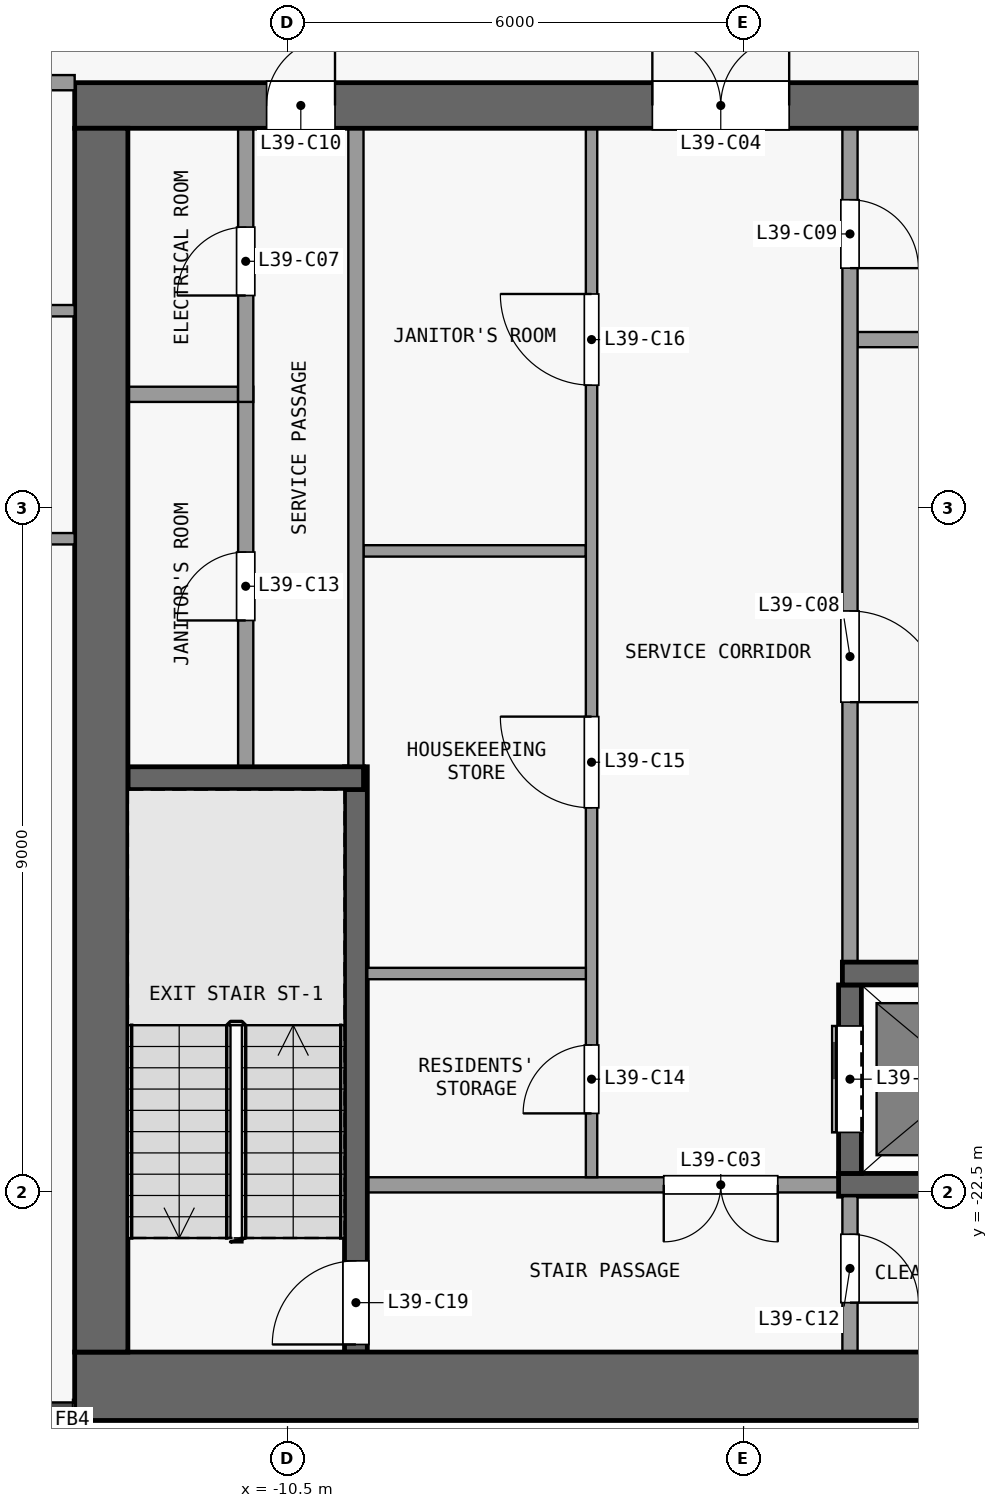
"""IFC4 building model, lengths in metres.
Left out: names, types, materials, properties, quantities, classifications, styles, units other than length and angle.
Written with IfcOpenShell. Run it as: python <this file> out.ifc"""

import sys

from ifc_helpers import new_model, si_unit, direction, frame, frame_2d, origin, place, context, subcontext, project, spatial, rectangle, extrude, element, fill, save


model = new_model("IFC4")
c1 = context("Model", 3, precision=1e-05, world=origin(), true_north=direction((0.0, 1.0)))
c2 = subcontext(c1, "Body", "Model", "MODEL_VIEW")
j1 = project(units=[si_unit("LENGTHUNIT", "METRE"), si_unit("PLANEANGLEUNIT", "RADIAN")], contexts=[c1])
p1 = place(None, origin())
s1 = spatial("IfcSite", under=j1, at=p1, CompositionType="ELEMENT")
p2 = place(p1, origin())
s2 = spatial("IfcBuilding", under=s1, at=p2, CompositionType="ELEMENT")
p3 = place(p2, frame((0.0, 0.0, 160.1)))
s3 = spatial("IfcBuildingStorey", under=s2, at=p3, CompositionType="ELEMENT", Elevation=160.1)
p4 = place(p3, frame((-13.3, -25.05, 0.0), z_axis=(0.0, 0.0, 1.0), x_axis=(1.0, 0.0, 0.0)))
e1 = element("IfcWall", 1, at=p4, inside=s3, PredefinedType="SHEAR", context=c2, shape_type="SweptSolid", body=[
    extrude(rectangle(XDim=26.6, YDim=0.9, at=frame_2d((13.3, 0.0))), origin(), (0.0, 0.0, 1.0), 3.3),
])
p5 = place(p3, frame((-13.3, -8.2, 0.0), z_axis=(0.0, 0.0, 1.0), x_axis=(1.0, 0.0, 0.0)))
e2 = element("IfcWall", 2, at=p5, inside=s3, PredefinedType="SHEAR", context=c2, shape_type="SweptSolid", body=[
    extrude(rectangle(XDim=26.6, YDim=0.6, at=frame_2d((13.3, 0.0))), origin(), (0.0, 0.0, 1.0), 3.3),
])
p6 = place(p5, frame((7.6, 0.0, 0.0)))
e3 = element("IfcOpeningElement", 3, at=p6, cuts=e2, PredefinedType="OPENING", context=c2, shape_type="SweptSolid", body=[
    extrude(rectangle(XDim=1.8, YDim=2.1, at=frame_2d((0.9, 1.05))), frame((0.0, 0.31, 0.0), z_axis=(0.0, -1.0, 0.0), x_axis=(1.0, 0.0, 0.0)), (0.0, 0.0, 1.0), 0.62),
])
p7 = place(p5, frame((17.2, 0.0, 0.0)))
e4 = element("IfcOpeningElement", 4, at=p7, cuts=e2, PredefinedType="OPENING", context=c2, shape_type="SweptSolid", body=[
    extrude(rectangle(XDim=1.8, YDim=2.1, at=frame_2d((0.9, 1.05))), frame((0.0, 0.31, 0.0), z_axis=(0.0, -1.0, 0.0), x_axis=(1.0, 0.0, 0.0)), (0.0, 0.0, 1.0), 0.62),
])
p8 = place(p5, frame((2.525, 0.0, 0.0)))
e5 = element("IfcOpeningElement", 5, at=p8, cuts=e2, PredefinedType="OPENING", context=c2, shape_type="SweptSolid", body=[
    extrude(rectangle(XDim=0.9, YDim=2.1, at=frame_2d((0.45, 1.05))), frame((0.0, 0.31, 0.0), z_axis=(0.0, -1.0, 0.0), x_axis=(1.0, 0.0, 0.0)), (0.0, 0.0, 1.0), 0.62),
])
p9 = place(p5, frame((23.875, 0.0, 0.0)))
e6 = element("IfcOpeningElement", 6, at=p9, cuts=e2, PredefinedType="OPENING", context=c2, shape_type="SweptSolid", body=[
    extrude(rectangle(XDim=1.2, YDim=2.1, at=frame_2d((0.6, 1.05))), frame((0.0, 0.31, 0.0), z_axis=(0.0, -1.0, 0.0), x_axis=(1.0, 0.0, 0.0)), (0.0, 0.0, 1.0), 0.62),
])
p10 = place(p3, frame((-12.95, -24.6, 0.0), z_axis=(0.0, 0.0, 1.0), x_axis=(0.0, 1.0, 0.0)))
e7 = element("IfcWall", 7, at=p10, inside=s3, PredefinedType="SHEAR", context=c2, shape_type="SweptSolid", body=[
    extrude(rectangle(XDim=16.1, YDim=0.7, at=frame_2d((8.05, 0.0))), origin(), (0.0, 0.0, 1.0), 3.3),
])
p11 = place(p3, frame((-3.25, -22.4, 0.0), z_axis=(0.0, 0.0, 1.0), x_axis=(-1.0, 0.0, 0.0)))
e8 = element("IfcWall", 8, at=p11, inside=s3, PredefinedType="PARTITIONING", context=c2, shape_type="SweptSolid", body=[
    extrude(rectangle(XDim=6.2, YDim=0.2, at=frame_2d((3.1, 0.0))), origin(), (0.0, 0.0, 1.0), 3.3),
])
p12 = place(p11, frame((0.8, 0.0, 0.0)))
e9 = element("IfcOpeningElement", 9, at=p12, cuts=e8, PredefinedType="OPENING", context=c2, shape_type="SweptSolid", body=[
    extrude(rectangle(XDim=1.5, YDim=2.1, at=frame_2d((0.75, 1.05))), frame((0.0, 0.11, 0.0), z_axis=(0.0, -1.0, 0.0), x_axis=(1.0, 0.0, 0.0)), (0.0, 0.0, 1.0), 0.22),
])
p13 = place(p3, frame((-3.25, -22.4, 0.0), z_axis=(0.0, 0.0, 1.0), x_axis=(1.0, 0.0, 0.0)))
e10 = element("IfcWall", 10, at=p13, inside=s3, PredefinedType="SHEAR", context=c2, shape_type="SweptSolid", body=[
    extrude(rectangle(XDim=6.2, YDim=0.3, at=frame_2d((3.1, 0.0))), origin(), (0.0, 0.0, 1.0), 3.3),
])
p14 = place(p3, frame((-9.45, -19.62, 0.0), z_axis=(0.0, 0.0, 1.0), x_axis=(1.0, 0.0, 0.0)))
e11 = element("IfcWall", 11, at=p14, inside=s3, PredefinedType="PARTITIONING", context=c2, shape_type="SweptSolid", body=[
    extrude(rectangle(XDim=2.875, YDim=0.15, at=frame_2d((1.438, 0.0))), origin(), (0.0, 0.0, 1.0), 3.3),
])
p15 = place(p3, frame((-3.2, -19.62, 0.0), z_axis=(0.0, 0.0, 1.0), x_axis=(1.0, 0.0, 0.0)))
e12 = element("IfcWall", 12, at=p15, inside=s3, PredefinedType="SHEAR", context=c2, shape_type="SweptSolid", body=[
    extrude(rectangle(XDim=3.05, YDim=0.3, at=frame_2d((1.525, 0.0))), origin(), (0.0, 0.0, 1.0), 3.3),
])
p16 = place(p3, frame((-12.6, -17.05, 0.0), z_axis=(0.0, 0.0, 1.0), x_axis=(1.0, 0.0, 0.0)))
e13 = element("IfcWall", 13, at=p16, inside=s3, PredefinedType="SHEAR", context=c2, shape_type="SweptSolid", body=[
    extrude(rectangle(XDim=3.1, YDim=0.3, at=frame_2d((1.55, 0.0))), origin(), (0.0, 0.0, 1.0), 3.3),
])
p17 = place(p3, frame((-9.5, -14.06, 0.0), z_axis=(0.0, 0.0, 1.0), x_axis=(1.0, 0.0, 0.0)))
e14 = element("IfcWall", 14, at=p17, inside=s3, PredefinedType="PARTITIONING", context=c2, shape_type="SweptSolid", body=[
    extrude(rectangle(XDim=2.925, YDim=0.15, at=frame_2d((1.462, 0.0))), origin(), (0.0, 0.0, 1.0), 3.3),
])
p18 = place(p3, frame((-12.6, -12.0, 0.0), z_axis=(0.0, 0.0, 1.0), x_axis=(1.0, 0.0, 0.0)))
e15 = element("IfcWall", 15, at=p18, inside=s3, PredefinedType="PARTITIONING", context=c2, shape_type="SweptSolid", body=[
    extrude(rectangle(XDim=1.45, YDim=0.2, at=frame_2d((0.725, 0.0))), origin(), (0.0, 0.0, 1.0), 3.3),
])
p19 = place(p3, frame((-3.0, -11.28, 0.0), z_axis=(0.0, 0.0, 1.0), x_axis=(1.0, 0.0, 0.0)))
e16 = element("IfcWall", 16, at=p19, inside=s3, PredefinedType="PARTITIONING", context=c2, shape_type="SweptSolid", body=[
    extrude(rectangle(XDim=2.85, YDim=0.2, at=frame_2d((1.425, 0.0))), origin(), (0.0, 0.0, 1.0), 3.3),
])
p20 = place(p3, frame((-11.05, -16.9, 0.0), z_axis=(0.0, 0.0, 1.0), x_axis=(0.0, 1.0, 0.0)))
e17 = element("IfcWall", 17, at=p20, inside=s3, PredefinedType="PARTITIONING", context=c2, shape_type="SweptSolid", body=[
    extrude(rectangle(XDim=5.0, YDim=0.2, at=frame_2d((2.5, 0.0))), origin(), (0.0, 0.0, 1.0), 3.3),
])
p21 = place(p20, frame((1.925, 0.0, 0.0)))
e18 = element("IfcOpeningElement", 18, at=p21, cuts=e17, PredefinedType="OPENING", context=c2, shape_type="SweptSolid", body=[
    extrude(rectangle(XDim=0.9, YDim=2.1, at=frame_2d((0.45, 1.05))), frame((0.0, 0.11, 0.0), z_axis=(0.0, -1.0, 0.0), x_axis=(1.0, 0.0, 0.0)), (0.0, 0.0, 1.0), 0.22),
])
p22 = place(p3, frame((-11.05, -12.1, 0.0), z_axis=(0.0, 0.0, 1.0), x_axis=(0.0, 1.0, 0.0)))
e19 = element("IfcWall", 19, at=p22, inside=s3, PredefinedType="PARTITIONING", context=c2, shape_type="SweptSolid", body=[
    extrude(rectangle(XDim=3.6, YDim=0.2, at=frame_2d((1.8, 0.0))), origin(), (0.0, 0.0, 1.0), 3.3),
])
p23 = place(p22, frame((1.4, 0.0, 0.0)))
e20 = element("IfcOpeningElement", 20, at=p23, cuts=e19, PredefinedType="OPENING", context=c2, shape_type="SweptSolid", body=[
    extrude(rectangle(XDim=0.9, YDim=2.1, at=frame_2d((0.45, 1.05))), frame((0.0, 0.11, 0.0), z_axis=(0.0, -1.0, 0.0), x_axis=(1.0, 0.0, 0.0)), (0.0, 0.0, 1.0), 0.22),
])
p24 = place(p3, frame((-9.6, -24.6, 0.0), z_axis=(0.0, 0.0, 1.0), x_axis=(0.0, 1.0, 0.0)))
e21 = element("IfcWall", 21, at=p24, inside=s3, PredefinedType="SHEAR", context=c2, shape_type="SweptSolid", body=[
    extrude(rectangle(XDim=7.7, YDim=0.3, at=frame_2d((3.85, 0.0))), origin(), (0.0, 0.0, 1.0), 3.3),
])
p25 = place(p24, frame((0.1, 0.0, 0.0)))
e22 = element("IfcOpeningElement", 22, at=p25, cuts=e21, PredefinedType="OPENING", context=c2, shape_type="SweptSolid", body=[
    extrude(rectangle(XDim=1.1, YDim=2.1, at=frame_2d((0.55, 1.05))), frame((0.0, 0.16, 0.0), z_axis=(0.0, -1.0, 0.0), x_axis=(1.0, 0.0, 0.0)), (0.0, 0.0, 1.0), 0.32),
])
p26 = place(p3, frame((-9.6, -16.9, 0.0), z_axis=(0.0, 0.0, 1.0), x_axis=(0.0, 1.0, 0.0)))
e23 = element("IfcWall", 23, at=p26, inside=s3, PredefinedType="PARTITIONING", context=c2, shape_type="SweptSolid", body=[
    extrude(rectangle(XDim=8.4, YDim=0.2, at=frame_2d((4.2, 0.0))), origin(), (0.0, 0.0, 1.0), 3.3),
])
p27 = place(p3, frame((-6.5, -22.3, 0.0), z_axis=(0.0, 0.0, 1.0), x_axis=(0.0, 1.0, 0.0)))
e24 = element("IfcWall", 24, at=p27, inside=s3, PredefinedType="PARTITIONING", context=c2, shape_type="SweptSolid", body=[
    extrude(rectangle(XDim=13.8, YDim=0.15, at=frame_2d((6.9, 0.0))), origin(), (0.0, 0.0, 1.0), 3.3),
])
p28 = place(p27, frame((0.84, 0.0, 0.0)))
e25 = element("IfcOpeningElement", 25, at=p28, cuts=e24, PredefinedType="OPENING", context=c2, shape_type="SweptSolid", body=[
    extrude(rectangle(XDim=0.9, YDim=2.1, at=frame_2d((0.45, 1.05))), frame((0.0, 0.085, 0.0), z_axis=(0.0, -1.0, 0.0), x_axis=(1.0, 0.0, 0.0)), (0.0, 0.0, 1.0), 0.17),
])
p29 = place(p27, frame((4.86, 0.0, 0.0)))
e26 = element("IfcOpeningElement", 26, at=p29, cuts=e24, PredefinedType="OPENING", context=c2, shape_type="SweptSolid", body=[
    extrude(rectangle(XDim=1.2, YDim=2.1, at=frame_2d((0.6, 1.05))), frame((0.0, 0.085, 0.0), z_axis=(0.0, -1.0, 0.0), x_axis=(1.0, 0.0, 0.0)), (0.0, 0.0, 1.0), 0.17),
])
p30 = place(p27, frame((10.42, 0.0, 0.0)))
e27 = element("IfcOpeningElement", 27, at=p30, cuts=e24, PredefinedType="OPENING", context=c2, shape_type="SweptSolid", body=[
    extrude(rectangle(XDim=1.2, YDim=2.1, at=frame_2d((0.6, 1.05))), frame((0.0, 0.085, 0.0), z_axis=(0.0, -1.0, 0.0), x_axis=(1.0, 0.0, 0.0)), (0.0, 0.0, 1.0), 0.17),
])
p31 = place(p3, frame((-3.1, -22.55, 0.0), z_axis=(0.0, 0.0, 1.0), x_axis=(0.0, -1.0, 0.0)))
e28 = element("IfcWall", 28, at=p31, inside=s3, PredefinedType="PARTITIONING", context=c2, shape_type="SweptSolid", body=[
    extrude(rectangle(XDim=2.05, YDim=0.2, at=frame_2d((1.025, 0.0))), origin(), (0.0, 0.0, 1.0), 3.3),
])
p32 = place(p31, frame((0.5, 0.0, 0.0)))
e29 = element("IfcOpeningElement", 29, at=p32, cuts=e28, PredefinedType="OPENING", context=c2, shape_type="SweptSolid", body=[
    extrude(rectangle(XDim=0.9, YDim=2.1, at=frame_2d((0.45, 1.05))), frame((0.0, 0.11, 0.0), z_axis=(0.0, -1.0, 0.0), x_axis=(1.0, 0.0, 0.0)), (0.0, 0.0, 1.0), 0.22),
])
p33 = place(p3, frame((-3.1, -22.25, 0.0), z_axis=(0.0, 0.0, 1.0), x_axis=(0.0, 1.0, 0.0)))
e30 = element("IfcWall", 30, at=p33, inside=s3, PredefinedType="SHEAR", context=c2, shape_type="SweptSolid", body=[
    extrude(rectangle(XDim=2.48, YDim=0.3, at=frame_2d((1.24, 0.0))), origin(), (0.0, 0.0, 1.0), 3.3),
])
p34 = place(p33, frame((0.54, 0.0, 0.0)))
e31 = element("IfcOpeningElement", 31, at=p34, cuts=e30, PredefinedType="OPENING", context=c2, shape_type="SweptSolid", body=[
    extrude(rectangle(XDim=1.4, YDim=2.1, at=frame_2d((0.7, 1.05))), frame((0.0, 0.16, 0.0), z_axis=(0.0, -1.0, 0.0), x_axis=(1.0, 0.0, 0.0)), (0.0, 0.0, 1.0), 0.32),
])
p35 = place(p3, frame((-3.1, -8.5, 0.0), z_axis=(0.0, 0.0, 1.0), x_axis=(0.0, -1.0, 0.0)))
e32 = element("IfcWall", 32, at=p35, inside=s3, PredefinedType="PARTITIONING", context=c2, shape_type="SweptSolid", body=[
    extrude(rectangle(XDim=10.97, YDim=0.2, at=frame_2d((5.485, 0.0))), origin(), (0.0, 0.0, 1.0), 3.3),
])
p36 = place(p35, frame((6.35, 0.0, 0.0)))
e33 = element("IfcOpeningElement", 33, at=p36, cuts=e32, PredefinedType="OPENING", context=c2, shape_type="SweptSolid", body=[
    extrude(rectangle(XDim=1.2, YDim=2.1, at=frame_2d((0.6, 1.05))), frame((0.0, 0.11, 0.0), z_axis=(0.0, -1.0, 0.0), x_axis=(1.0, 0.0, 0.0)), (0.0, 0.0, 1.0), 0.22),
])
p37 = place(p35, frame((0.94, 0.0, 0.0)))
e34 = element("IfcOpeningElement", 34, at=p37, cuts=e32, PredefinedType="OPENING", context=c2, shape_type="SweptSolid", body=[
    extrude(rectangle(XDim=0.9, YDim=2.1, at=frame_2d((0.45, 1.05))), frame((0.0, 0.11, 0.0), z_axis=(0.0, -1.0, 0.0), x_axis=(1.0, 0.0, 0.0)), (0.0, 0.0, 1.0), 0.22),
])
p38 = place(p3, frame((-19.262, -13.9, 0.0), z_axis=(0.0, 0.0, 1.0), x_axis=(1.0, 0.0, 0.0)))
e35 = element("IfcWall", 35, at=p38, inside=s3, PredefinedType="PARTITIONING", context=c2, shape_type="SweptSolid", body=[
    extrude(rectangle(XDim=5.962, YDim=0.15, at=frame_2d((2.981, 0.0))), origin(), (0.0, 0.0, 1.0), 3.3),
])
p39 = place(p38, frame((0.512, 0.0, 0.0)))
e36 = element("IfcOpeningElement", 36, at=p39, cuts=e35, PredefinedType="OPENING", context=c2, shape_type="SweptSolid", body=[
    extrude(rectangle(XDim=0.9, YDim=2.1, at=frame_2d((0.45, 1.05))), frame((0.0, 0.085, 0.0), z_axis=(0.0, -1.0, 0.0), x_axis=(1.0, 0.0, 0.0)), (0.0, 0.0, 1.0), 0.17),
])
p40 = place(p3, frame((-20.163, -10.9, 0.0), z_axis=(0.0, 0.0, 1.0), x_axis=(1.0, 0.0, 0.0)))
e37 = element("IfcWall", 37, at=p40, inside=s3, PredefinedType="PARTITIONING", context=c2, shape_type="SweptSolid", body=[
    extrude(rectangle(XDim=6.863, YDim=0.15, at=frame_2d((3.431, 0.0))), origin(), (0.0, 0.0, 1.0), 3.3),
])
p41 = place(p40, frame((1.413, 0.0, 0.0)))
e38 = element("IfcOpeningElement", 38, at=p41, cuts=e37, PredefinedType="OPENING", context=c2, shape_type="SweptSolid", body=[
    extrude(rectangle(XDim=0.9, YDim=2.1, at=frame_2d((0.45, 1.05))), frame((0.0, 0.085, 0.0), z_axis=(0.0, -1.0, 0.0), x_axis=(1.0, 0.0, 0.0)), (0.0, 0.0, 1.0), 0.17),
])
p42 = place(p40, frame((4.863, 0.0, 0.0)))
e39 = element("IfcOpeningElement", 39, at=p42, cuts=e37, PredefinedType="OPENING", context=c2, shape_type="SweptSolid", body=[
    extrude(rectangle(XDim=0.9, YDim=2.1, at=frame_2d((0.45, 1.05))), frame((0.0, 0.085, 0.0), z_axis=(0.0, -1.0, 0.0), x_axis=(1.0, 0.0, 0.0)), (0.0, 0.0, 1.0), 0.17),
])
p43 = place(p3, frame((-20.163, -7.9, 0.0), z_axis=(0.0, 0.0, 1.0), x_axis=(1.0, 0.0, 0.0)))
e40 = element("IfcWall", 40, at=p43, inside=s3, PredefinedType="PARTITIONING", context=c2, shape_type="SweptSolid", body=[
    extrude(rectangle(XDim=6.863, YDim=0.2, at=frame_2d((3.431, 0.0))), origin(), (0.0, 0.0, 1.0), 3.3),
])
p44 = place(p43, frame((2.913, 0.0, 0.0)))
e41 = element("IfcOpeningElement", 41, at=p44, cuts=e40, PredefinedType="OPENING", context=c2, shape_type="SweptSolid", body=[
    extrude(rectangle(XDim=1.0, YDim=2.1, at=frame_2d((0.5, 1.05))), frame((0.0, 0.11, 0.0), z_axis=(0.0, -1.0, 0.0), x_axis=(1.0, 0.0, 0.0)), (0.0, 0.0, 1.0), 0.22),
])
p45 = place(p34, origin())
e42 = element("IfcDoor", 42, at=p45, inside=s3, OperationType="DOUBLE_DOOR_SLIDING", PredefinedType="DOOR", context=c2, shape_type="SweptSolid", body=[
    extrude(rectangle(XDim=1.4, YDim=2.1, at=frame_2d((0.7, 1.05))), frame((0.0, 0.025, 0.0), z_axis=(0.0, -1.0, 0.0), x_axis=(1.0, 0.0, 0.0)), (0.0, 0.0, 1.0), 0.05),
])
fill(e31, e42)
p46 = place(p12, origin())
e43 = element("IfcDoor", 43, at=p46, inside=s3, OperationType="DOUBLE_DOOR_SINGLE_SWING", PredefinedType="DOOR", context=c2, shape_type="SweptSolid", body=[
    extrude(rectangle(XDim=1.5, YDim=2.1, at=frame_2d((0.75, 1.05))), frame((0.0, 0.025, 0.0), z_axis=(0.0, -1.0, 0.0), x_axis=(1.0, 0.0, 0.0)), (0.0, 0.0, 1.0), 0.05),
])
fill(e9, e43)
p47 = place(p6, origin())
e44 = element("IfcDoor", 44, at=p47, inside=s3, OperationType="DOUBLE_DOOR_SINGLE_SWING", PredefinedType="DOOR", context=c2, shape_type="SweptSolid", body=[
    extrude(rectangle(XDim=1.8, YDim=2.1, at=frame_2d((0.9, 1.05))), frame((0.0, 0.025, 0.0), z_axis=(0.0, -1.0, 0.0), x_axis=(1.0, 0.0, 0.0)), (0.0, 0.0, 1.0), 0.05),
])
fill(e3, e44)
p48 = place(p23, origin())
e45 = element("IfcDoor", 45, at=p48, inside=s3, OperationType="SINGLE_SWING_LEFT", PredefinedType="DOOR", context=c2, shape_type="SweptSolid", body=[
    extrude(rectangle(XDim=0.9, YDim=2.1, at=frame_2d((0.45, 1.05))), frame((0.0, 0.025, 0.0), z_axis=(0.0, -1.0, 0.0), x_axis=(1.0, 0.0, 0.0)), (0.0, 0.0, 1.0), 0.05),
])
fill(e20, e45)
p49 = place(p36, origin())
e46 = element("IfcDoor", 46, at=p49, inside=s3, OperationType="SINGLE_SWING_RIGHT", PredefinedType="DOOR", context=c2, shape_type="SweptSolid", body=[
    extrude(rectangle(XDim=1.2, YDim=2.1, at=frame_2d((0.6, 1.05))), frame((0.0, 0.025, 0.0), z_axis=(0.0, -1.0, 0.0), x_axis=(1.0, 0.0, 0.0)), (0.0, 0.0, 1.0), 0.05),
])
fill(e33, e46)
p50 = place(p37, origin())
e47 = element("IfcDoor", 47, at=p50, inside=s3, OperationType="SINGLE_SWING_RIGHT", PredefinedType="DOOR", context=c2, shape_type="SweptSolid", body=[
    extrude(rectangle(XDim=0.9, YDim=2.1, at=frame_2d((0.45, 1.05))), frame((0.0, 0.025, 0.0), z_axis=(0.0, -1.0, 0.0), x_axis=(1.0, 0.0, 0.0)), (0.0, 0.0, 1.0), 0.05),
])
fill(e34, e47)
p51 = place(p8, origin())
e48 = element("IfcDoor", 48, at=p51, inside=s3, OperationType="SINGLE_SWING_RIGHT", PredefinedType="DOOR", context=c2, shape_type="SweptSolid", body=[
    extrude(rectangle(XDim=0.9, YDim=2.1, at=frame_2d((0.45, 1.05))), frame((0.0, 0.025, 0.0), z_axis=(0.0, -1.0, 0.0), x_axis=(1.0, 0.0, 0.0)), (0.0, 0.0, 1.0), 0.05),
])
fill(e5, e48)
p52 = place(p32, origin())
e49 = element("IfcDoor", 49, at=p52, inside=s3, OperationType="SINGLE_SWING_RIGHT", PredefinedType="DOOR", context=c2, shape_type="SweptSolid", body=[
    extrude(rectangle(XDim=0.9, YDim=2.1, at=frame_2d((0.45, 1.05))), frame((0.0, 0.025, 0.0), z_axis=(0.0, -1.0, 0.0), x_axis=(1.0, 0.0, 0.0)), (0.0, 0.0, 1.0), 0.05),
])
fill(e29, e49)
p53 = place(p21, origin())
e50 = element("IfcDoor", 50, at=p53, inside=s3, OperationType="SINGLE_SWING_LEFT", PredefinedType="DOOR", context=c2, shape_type="SweptSolid", body=[
    extrude(rectangle(XDim=0.9, YDim=2.1, at=frame_2d((0.45, 1.05))), frame((0.0, 0.025, 0.0), z_axis=(0.0, -1.0, 0.0), x_axis=(1.0, 0.0, 0.0)), (0.0, 0.0, 1.0), 0.05),
])
fill(e18, e50)
p54 = place(p28, origin())
e51 = element("IfcDoor", 51, at=p54, inside=s3, OperationType="SINGLE_SWING_LEFT", PredefinedType="DOOR", context=c2, shape_type="SweptSolid", body=[
    extrude(rectangle(XDim=0.9, YDim=2.1, at=frame_2d((0.45, 1.05))), frame((0.0, 0.025, 0.0), z_axis=(0.0, -1.0, 0.0), x_axis=(1.0, 0.0, 0.0)), (0.0, 0.0, 1.0), 0.05),
])
fill(e25, e51)
p55 = place(p29, origin())
e52 = element("IfcDoor", 52, at=p55, inside=s3, OperationType="SINGLE_SWING_RIGHT", PredefinedType="DOOR", context=c2, shape_type="SweptSolid", body=[
    extrude(rectangle(XDim=1.2, YDim=2.1, at=frame_2d((0.6, 1.05))), frame((0.0, 0.025, 0.0), z_axis=(0.0, -1.0, 0.0), x_axis=(1.0, 0.0, 0.0)), (0.0, 0.0, 1.0), 0.05),
])
fill(e26, e52)
p56 = place(p30, origin())
e53 = element("IfcDoor", 53, at=p56, inside=s3, OperationType="SINGLE_SWING_RIGHT", PredefinedType="DOOR", context=c2, shape_type="SweptSolid", body=[
    extrude(rectangle(XDim=1.2, YDim=2.1, at=frame_2d((0.6, 1.05))), frame((0.0, 0.025, 0.0), z_axis=(0.0, -1.0, 0.0), x_axis=(1.0, 0.0, 0.0)), (0.0, 0.0, 1.0), 0.05),
])
fill(e27, e53)
p57 = place(p25, origin())
e54 = element("IfcDoor", 54, at=p57, inside=s3, OperationType="SINGLE_SWING_LEFT", PredefinedType="DOOR", context=c2, shape_type="SweptSolid", body=[
    extrude(rectangle(XDim=1.1, YDim=2.1, at=frame_2d((0.55, 1.05))), frame((0.0, 0.025, 0.0), z_axis=(0.0, -1.0, 0.0), x_axis=(1.0, 0.0, 0.0)), (0.0, 0.0, 1.0), 0.05),
])
fill(e22, e54)
save(model, sys.argv[1])
